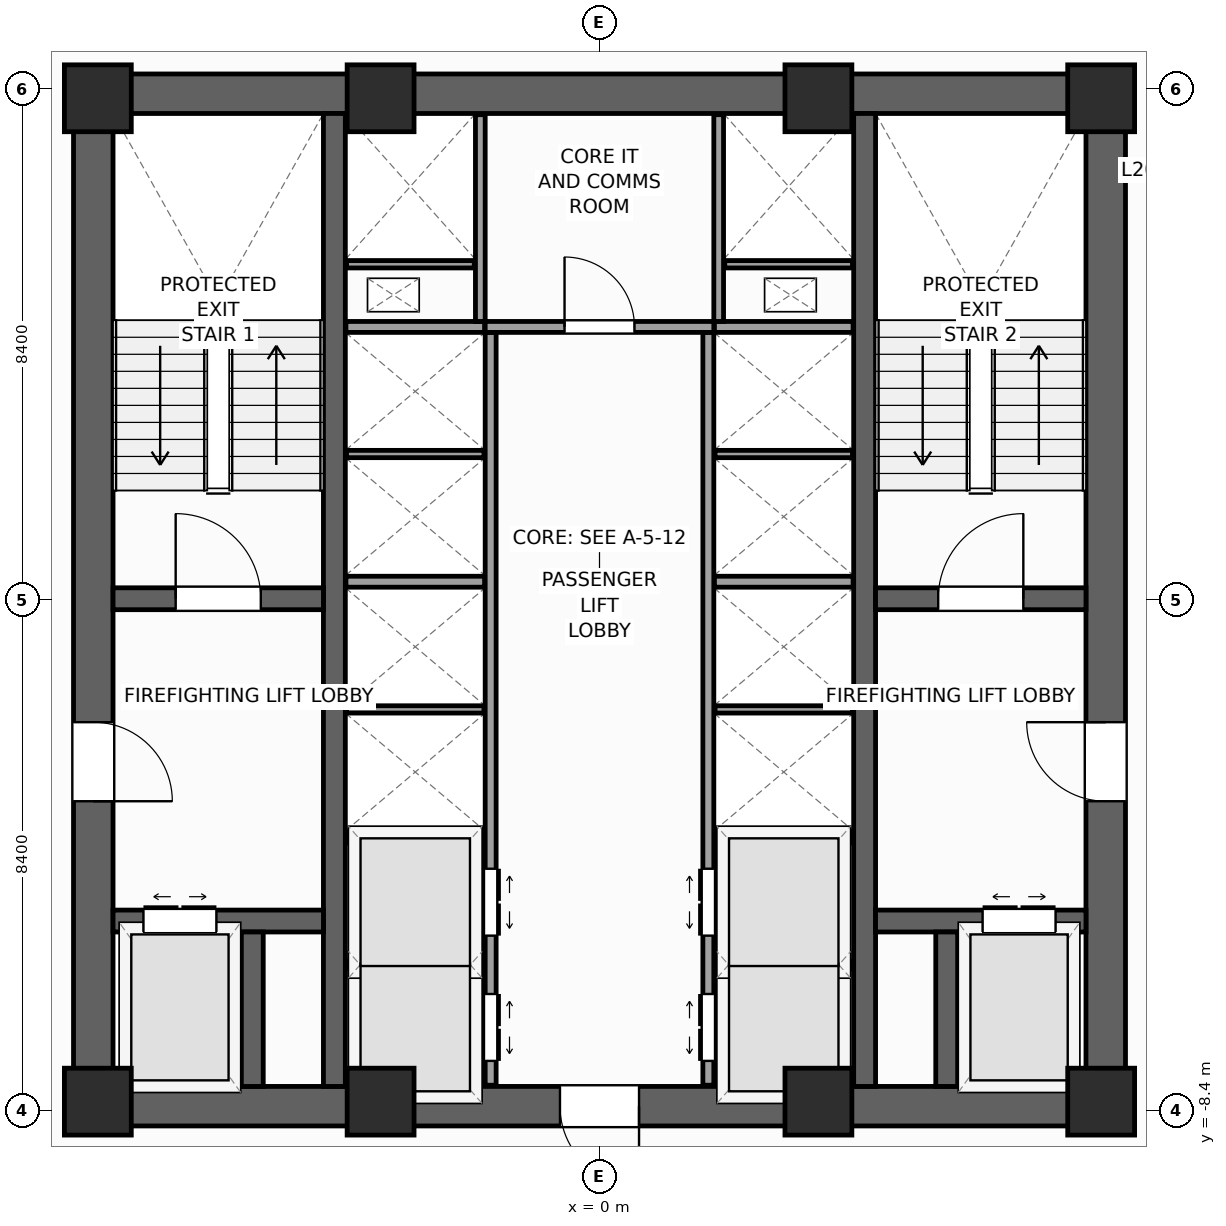
"""IFC4 building model, lengths in metres.
Left out: names, types, materials, properties, quantities, classifications, styles, units other than length and angle.
Written with IfcOpenShell. Run it as: python <this file> out.ifc"""

import sys

from ifc_helpers import new_model, si_unit, direction, frame, frame_2d, origin, origin_2d, place, context, subcontext, project, spatial, rectangle, extrude, source, transform, mapped, element, fill, save


model = new_model("IFC4")
c1 = context("Model", 3, precision=1e-05, world=origin(), true_north=direction((0.0, 1.0)))
c2 = subcontext(c1, "Body", "Model", "MODEL_VIEW")
j1 = project(units=[si_unit("LENGTHUNIT", "METRE"), si_unit("PLANEANGLEUNIT", "RADIAN")], contexts=[c1])
p1 = place(None, origin())
s1 = spatial("IfcSite", under=j1, at=p1, CompositionType="ELEMENT")
p2 = place(p1, origin())
s2 = spatial("IfcBuilding", under=s1, at=p2, CompositionType="ELEMENT")
p3 = place(p2, frame((0.0, 0.0, 87.2)))
s3 = spatial("IfcBuildingStorey", under=s2, at=p3, CompositionType="ELEMENT", Elevation=87.2)
p4 = place(p3, frame((-8.65, -8.325, 0.0), z_axis=(0.0, 0.0, 1.0), x_axis=(1.0, 0.0, 0.0)))
e1 = element("IfcWall", 1, at=p4, inside=s3, PredefinedType="SHEAR", context=c2, shape_type="SweptSolid", body=[
    extrude(rectangle(XDim=17.3, YDim=0.65, at=frame_2d((8.65, 0.0))), origin(), (0.0, 0.0, 1.0), 4.0),
])
p5 = place(p4, frame((8.0, 0.0, 0.0)))
e2 = element("IfcOpeningElement", 2, at=p5, cuts=e1, PredefinedType="OPENING", context=c2, shape_type="SweptSolid", body=[
    extrude(rectangle(XDim=1.3, YDim=2.2, at=frame_2d((0.65, 1.1))), frame((0.0, 0.335, 0.0), z_axis=(0.0, -1.0, 0.0), x_axis=(1.0, 0.0, 0.0)), (0.0, 0.0, 1.0), 0.67),
])
p6 = place(p3, frame((-8.65, 8.325, 0.0), z_axis=(0.0, 0.0, 1.0), x_axis=(1.0, 0.0, 0.0)))
e3 = element("IfcWall", 3, at=p6, inside=s3, PredefinedType="SHEAR", context=c2, shape_type="SweptSolid", body=[
    extrude(rectangle(XDim=17.3, YDim=0.65, at=frame_2d((8.65, 0.0))), origin(), (0.0, 0.0, 1.0), 4.0),
])
p7 = place(p3, frame((-8.325, -8.0, 0.0), z_axis=(0.0, 0.0, 1.0), x_axis=(0.0, 1.0, 0.0)))
e4 = element("IfcWall", 4, at=p7, inside=s3, PredefinedType="SHEAR", context=c2, shape_type="SweptSolid", body=[
    extrude(rectangle(XDim=16.0, YDim=0.65, at=frame_2d((8.0, 0.0))), origin(), (0.0, 0.0, 1.0), 4.0),
])
p8 = place(p7, frame((4.69, 0.0, 0.0)))
e5 = element("IfcOpeningElement", 5, at=p8, cuts=e4, PredefinedType="OPENING", context=c2, shape_type="SweptSolid", body=[
    extrude(rectangle(XDim=1.3, YDim=2.2, at=frame_2d((0.65, 1.1))), frame((0.0, 0.335, 0.0), z_axis=(0.0, -1.0, 0.0), x_axis=(1.0, 0.0, 0.0)), (0.0, 0.0, 1.0), 0.67),
])
p9 = place(p3, frame((8.325, -8.0, 0.0), z_axis=(0.0, 0.0, 1.0), x_axis=(0.0, 1.0, 0.0)))
e6 = element("IfcWall", 6, at=p9, inside=s3, PredefinedType="SHEAR", context=c2, shape_type="SweptSolid", body=[
    extrude(rectangle(XDim=16.0, YDim=0.65, at=frame_2d((8.0, 0.0))), origin(), (0.0, 0.0, 1.0), 4.0),
])
p10 = place(p9, frame((4.69, 0.0, 0.0)))
e7 = element("IfcOpeningElement", 7, at=p10, cuts=e6, PredefinedType="OPENING", context=c2, shape_type="SweptSolid", body=[
    extrude(rectangle(XDim=1.3, YDim=2.2, at=frame_2d((0.65, 1.1))), frame((0.0, 0.335, 0.0), z_axis=(0.0, -1.0, 0.0), x_axis=(1.0, 0.0, 0.0)), (0.0, 0.0, 1.0), 0.67),
])
for number, where, z_axis, x_axis in (
    (8, (-4.36, -8.0, 0.0), (0.0, 0.0, 1.0), (0.0, 1.0, 0.0)),
    (9, (4.36, -8.0, 0.0), (0.0, 0.0, 1.0), (0.0, 1.0, 0.0)),
):
    element("IfcWall", number, at=place(p3, frame(where, z_axis=z_axis, x_axis=x_axis)), inside=s3, PredefinedType="SHEAR", context=c2, shape_type="SweptSolid", body=[
        extrude(rectangle(XDim=16.0, YDim=0.36, at=frame_2d((8.0, 0.0))), origin(), (0.0, 0.0, 1.0), 4.0),
    ])
p11 = place(p3, frame((-8.0, 0.02, 0.0), z_axis=(0.0, 0.0, 1.0), x_axis=(1.0, 0.0, 0.0)))
e10 = element("IfcWall", 10, at=p11, inside=s3, PredefinedType="SHEAR", context=c2, shape_type="SweptSolid", body=[
    extrude(rectangle(XDim=3.46, YDim=0.36, at=frame_2d((1.73, 0.0))), origin(), (0.0, 0.0, 1.0), 4.0),
])
p12 = place(p11, frame((1.03, 0.0, 0.0)))
e11 = element("IfcOpeningElement", 11, at=p12, cuts=e10, PredefinedType="OPENING", context=c2, shape_type="SweptSolid", body=[
    extrude(rectangle(XDim=1.4, YDim=2.2, at=frame_2d((0.7, 1.1))), frame((0.0, 0.19, 0.0), z_axis=(0.0, -1.0, 0.0), x_axis=(1.0, 0.0, 0.0)), (0.0, 0.0, 1.0), 0.38),
])
p13 = place(p3, frame((4.54, 0.02, 0.0), z_axis=(0.0, 0.0, 1.0), x_axis=(1.0, 0.0, 0.0)))
e12 = element("IfcWall", 12, at=p13, inside=s3, PredefinedType="SHEAR", context=c2, shape_type="SweptSolid", body=[
    extrude(rectangle(XDim=3.46, YDim=0.36, at=frame_2d((1.73, 0.0))), origin(), (0.0, 0.0, 1.0), 4.0),
])
p14 = place(p13, frame((1.03, 0.0, 0.0)))
e13 = element("IfcOpeningElement", 13, at=p14, cuts=e12, PredefinedType="OPENING", context=c2, shape_type="SweptSolid", body=[
    extrude(rectangle(XDim=1.4, YDim=2.2, at=frame_2d((0.7, 1.1))), frame((0.0, 0.19, 0.0), z_axis=(0.0, -1.0, 0.0), x_axis=(1.0, 0.0, 0.0)), (0.0, 0.0, 1.0), 0.38),
])
p15 = place(p3, frame((-8.0, -5.28, 0.0), z_axis=(0.0, 0.0, 1.0), x_axis=(1.0, 0.0, 0.0)))
e14 = element("IfcWall", 14, at=p15, inside=s3, PredefinedType="SHEAR", context=c2, shape_type="SweptSolid", body=[
    extrude(rectangle(XDim=3.46, YDim=0.36, at=frame_2d((1.73, 0.0))), origin(), (0.0, 0.0, 1.0), 4.0),
])
p16 = place(p15, frame((0.5, 0.0, 0.0)))
e15 = element("IfcOpeningElement", 15, at=p16, cuts=e14, PredefinedType="OPENING", context=c2, shape_type="SweptSolid", body=[
    extrude(rectangle(XDim=1.2, YDim=2.25, at=frame_2d((0.6, 1.125))), frame((0.0, 0.19, 0.0), z_axis=(0.0, -1.0, 0.0), x_axis=(1.0, 0.0, 0.0)), (0.0, 0.0, 1.0), 0.38),
])
p17 = place(p3, frame((4.54, -5.28, 0.0), z_axis=(0.0, 0.0, 1.0), x_axis=(1.0, 0.0, 0.0)))
e16 = element("IfcWall", 16, at=p17, inside=s3, PredefinedType="SHEAR", context=c2, shape_type="SweptSolid", body=[
    extrude(rectangle(XDim=3.46, YDim=0.36, at=frame_2d((1.73, 0.0))), origin(), (0.0, 0.0, 1.0), 4.0),
])
p18 = place(p17, frame((1.76, 0.0, 0.0)))
e17 = element("IfcOpeningElement", 17, at=p18, cuts=e16, PredefinedType="OPENING", context=c2, shape_type="SweptSolid", body=[
    extrude(rectangle(XDim=1.2, YDim=2.25, at=frame_2d((0.6, 1.125))), frame((0.0, 0.19, 0.0), z_axis=(0.0, -1.0, 0.0), x_axis=(1.0, 0.0, 0.0)), (0.0, 0.0, 1.0), 0.38),
])
for number, where, z_axis, x_axis in (
    (18, (-5.71, -8.0, 0.0), (0.0, 0.0, 1.0), (0.0, 1.0, 0.0)),
    (19, (5.71, -8.0, 0.0), (0.0, 0.0, 1.0), (0.0, 1.0, 0.0)),
):
    element("IfcWall", number, at=place(p3, frame(where, z_axis=z_axis, x_axis=x_axis)), inside=s3, PredefinedType="SHEAR", context=c2, shape_type="SweptSolid", body=[
        extrude(rectangle(XDim=2.54, YDim=0.36, at=frame_2d((1.27, 0.0))), origin(), (0.0, 0.0, 1.0), 4.0),
    ])
m1 = source(origin(), c2, "Body", "SweptSolid", [
    extrude(rectangle(XDim=1.1, YDim=1.1, at=origin_2d()), origin(), (0.0, 0.0, 1.0), 4.0),
])
for number, where, z_axis, x_axis in (
    (20, (-8.25, -8.25, 0.0), (0.0, 0.0, 1.0), (1.0, 0.0, 0.0)),
    (21, (8.25, -8.25, 0.0), (0.0, 0.0, 1.0), (1.0, 0.0, 0.0)),
    (22, (8.25, 8.25, 0.0), (0.0, 0.0, 1.0), (1.0, 0.0, 0.0)),
    (23, (-8.25, 8.25, 0.0), (0.0, 0.0, 1.0), (1.0, 0.0, 0.0)),
    (24, (-3.6, -8.25, 0.0), (0.0, 0.0, 1.0), (1.0, 0.0, 0.0)),
    (25, (3.6, -8.25, 0.0), (0.0, 0.0, 1.0), (1.0, 0.0, 0.0)),
    (26, (-3.6, 8.25, 0.0), (0.0, 0.0, 1.0), (1.0, 0.0, 0.0)),
    (27, (3.6, 8.25, 0.0), (0.0, 0.0, 1.0), (1.0, 0.0, 0.0)),
):
    element("IfcColumn", number, at=place(p3, frame(where, z_axis=z_axis, x_axis=x_axis)), inside=s3, PredefinedType="PILASTER", context=c2, shape_type="MappedRepresentation", body=[
        mapped(m1, transform((0.0, 0.0, 0.0), scale=1.0)),
    ])
p19 = place(p3, frame((-1.79, -7.98, 0.0), z_axis=(0.0, 0.0, 1.0), x_axis=(0.0, 1.0, 0.0)))
e28 = element("IfcWall", 28, at=p19, inside=s3, PredefinedType="PARTITIONING", context=c2, shape_type="SweptSolid", body=[
    extrude(rectangle(XDim=12.38, YDim=0.18, at=frame_2d((6.19, 0.0))), origin(), (0.0, 0.0, 1.0), 3.74),
])
p20 = place(p19, frame((0.4, 0.0, 0.0)))
e29 = element("IfcOpeningElement", 29, at=p20, cuts=e28, PredefinedType="OPENING", context=c2, shape_type="SweptSolid", body=[
    extrude(rectangle(XDim=1.1, YDim=2.2, at=frame_2d((0.55, 1.1))), frame((0.0, 0.1, 0.0), z_axis=(0.0, -1.0, 0.0), x_axis=(1.0, 0.0, 0.0)), (0.0, 0.0, 1.0), 0.2),
])
p21 = place(p19, frame((2.46, 0.0, 0.0)))
e30 = element("IfcOpeningElement", 30, at=p21, cuts=e28, PredefinedType="OPENING", context=c2, shape_type="SweptSolid", body=[
    extrude(rectangle(XDim=1.1, YDim=2.2, at=frame_2d((0.55, 1.1))), frame((0.0, 0.1, 0.0), z_axis=(0.0, -1.0, 0.0), x_axis=(1.0, 0.0, 0.0)), (0.0, 0.0, 1.0), 0.2),
])
p22 = place(p3, frame((1.79, -7.98, 0.0), z_axis=(0.0, 0.0, 1.0), x_axis=(0.0, 1.0, 0.0)))
e31 = element("IfcWall", 31, at=p22, inside=s3, PredefinedType="PARTITIONING", context=c2, shape_type="SweptSolid", body=[
    extrude(rectangle(XDim=12.38, YDim=0.18, at=frame_2d((6.19, 0.0))), origin(), (0.0, 0.0, 1.0), 3.74),
])
p23 = place(p22, frame((0.4, 0.0, 0.0)))
e32 = element("IfcOpeningElement", 32, at=p23, cuts=e31, PredefinedType="OPENING", context=c2, shape_type="SweptSolid", body=[
    extrude(rectangle(XDim=1.1, YDim=2.2, at=frame_2d((0.55, 1.1))), frame((0.0, 0.1, 0.0), z_axis=(0.0, -1.0, 0.0), x_axis=(1.0, 0.0, 0.0)), (0.0, 0.0, 1.0), 0.2),
])
p24 = place(p22, frame((2.46, 0.0, 0.0)))
e33 = element("IfcOpeningElement", 33, at=p24, cuts=e31, PredefinedType="OPENING", context=c2, shape_type="SweptSolid", body=[
    extrude(rectangle(XDim=1.1, YDim=2.2, at=frame_2d((0.55, 1.1))), frame((0.0, 0.1, 0.0), z_axis=(0.0, -1.0, 0.0), x_axis=(1.0, 0.0, 0.0)), (0.0, 0.0, 1.0), 0.2),
])
p25 = place(p3, frame((-1.88, 4.49, 0.0), z_axis=(0.0, 0.0, 1.0), x_axis=(1.0, 0.0, 0.0)))
e34 = element("IfcWall", 34, at=p25, inside=s3, PredefinedType="PARTITIONING", context=c2, shape_type="SweptSolid", body=[
    extrude(rectangle(XDim=3.76, YDim=0.18, at=frame_2d((1.88, 0.0))), origin(), (0.0, 0.0, 1.0), 3.74),
])
p26 = place(p25, frame((1.305, 0.0, 0.0)))
e35 = element("IfcOpeningElement", 35, at=p26, cuts=e34, PredefinedType="OPENING", context=c2, shape_type="SweptSolid", body=[
    extrude(rectangle(XDim=1.15, YDim=2.25, at=frame_2d((0.575, 1.125))), frame((0.0, 0.1, 0.0), z_axis=(0.0, -1.0, 0.0), x_axis=(1.0, 0.0, 0.0)), (0.0, 0.0, 1.0), 0.2),
])
for number, where, z_axis, x_axis in (
    (36, (-4.17, -3.9, 0.0), (0.0, 0.0, 1.0), (1.0, 0.0, 0.0)),
    (37, (1.89, -3.9, 0.0), (0.0, 0.0, 1.0), (1.0, 0.0, 0.0)),
    (38, (-4.17, 0.3, 0.0), (0.0, 0.0, 1.0), (1.0, 0.0, 0.0)),
    (39, (1.89, 0.3, 0.0), (0.0, 0.0, 1.0), (1.0, 0.0, 0.0)),
    (40, (-4.17, 4.49, 0.0), (0.0, 0.0, 1.0), (1.0, 0.0, 0.0)),
    (41, (1.89, 4.49, 0.0), (0.0, 0.0, 1.0), (1.0, 0.0, 0.0)),
):
    element("IfcWall", number, at=place(p3, frame(where, z_axis=z_axis, x_axis=x_axis)), inside=s3, PredefinedType="PARTITIONING", context=c2, shape_type="SweptSolid", body=[
        extrude(rectangle(XDim=2.28, YDim=0.18, at=frame_2d((1.14, 0.0))), origin(), (0.0, 0.0, 1.0), 3.74),
    ])
for number, where, z_axis, x_axis in (
    (42, (-4.16, -6.0, 0.0), (0.0, 0.0, 1.0), (1.0, 0.0, 0.0)),
    (43, (1.9, -6.0, 0.0), (0.0, 0.0, 1.0), (1.0, 0.0, 0.0)),
    (44, (-4.16, -1.8, 0.0), (0.0, 0.0, 1.0), (1.0, 0.0, 0.0)),
    (45, (1.9, -1.8, 0.0), (0.0, 0.0, 1.0), (1.0, 0.0, 0.0)),
    (46, (-4.16, 2.4, 0.0), (0.0, 0.0, 1.0), (1.0, 0.0, 0.0)),
    (47, (1.9, 2.4, 0.0), (0.0, 0.0, 1.0), (1.0, 0.0, 0.0)),
):
    element("IfcWall", number, at=place(p3, frame(where, z_axis=z_axis, x_axis=x_axis)), inside=s3, PredefinedType="PARTITIONING", context=c2, shape_type="SweptSolid", body=[
        extrude(rectangle(XDim=2.26, YDim=0.12, at=frame_2d((1.13, 0.0))), origin(), (0.0, 0.0, 1.0), 3.74),
    ])
for number, where, z_axis, x_axis in (
    (48, (-1.96, 4.58, 0.0), (0.0, 0.0, 1.0), (0.0, 1.0, 0.0)),
    (49, (1.96, 4.58, 0.0), (0.0, 0.0, 1.0), (0.0, 1.0, 0.0)),
):
    element("IfcWall", number, at=place(p3, frame(where, z_axis=z_axis, x_axis=x_axis)), inside=s3, PredefinedType="PARTITIONING", context=c2, shape_type="SweptSolid", body=[
        extrude(rectangle(XDim=3.4, YDim=0.16, at=frame_2d((1.7, 0.0))), origin(), (0.0, 0.0, 1.0), 3.74),
    ])
for number, where, z_axis, x_axis in (
    (50, (-4.16, 5.52, 0.0), (0.0, 0.0, 1.0), (1.0, 0.0, 0.0)),
    (51, (2.06, 5.52, 0.0), (0.0, 0.0, 1.0), (1.0, 0.0, 0.0)),
):
    element("IfcWall", number, at=place(p3, frame(where, z_axis=z_axis, x_axis=x_axis)), inside=s3, PredefinedType="PARTITIONING", context=c2, shape_type="SweptSolid", body=[
        extrude(rectangle(XDim=2.1, YDim=0.12, at=frame_2d((1.05, 0.0))), origin(), (0.0, 0.0, 1.0), 3.74),
    ])
m2 = source(origin(), c2, "Body", "SweptSolid", [
    extrude(rectangle(XDim=1.4, YDim=2.2, at=frame_2d((0.7, 1.1))), frame((0.0, 0.025, 0.0), z_axis=(0.0, -1.0, 0.0), x_axis=(1.0, 0.0, 0.0)), (0.0, 0.0, 1.0), 0.05),
])
p27 = place(p12, origin())
e52 = element("IfcDoor", 52, at=p27, inside=s3, OperationType="SINGLE_SWING_LEFT", PredefinedType="DOOR", context=c2, shape_type="MappedRepresentation", body=[
    mapped(m2, transform((0.0, 0.0, 0.0), scale=1.0)),
])
fill(e11, e52)
p28 = place(p14, origin())
e53 = element("IfcDoor", 53, at=p28, inside=s3, OperationType="SINGLE_SWING_RIGHT", PredefinedType="DOOR", context=c2, shape_type="MappedRepresentation", body=[
    mapped(m2, transform((0.0, 0.0, 0.0), scale=1.0)),
])
fill(e13, e53)
m3 = source(origin(), c2, "Body", "SweptSolid", [
    extrude(rectangle(XDim=1.3, YDim=2.2, at=frame_2d((0.65, 1.1))), frame((0.0, 0.025, 0.0), z_axis=(0.0, -1.0, 0.0), x_axis=(1.0, 0.0, 0.0)), (0.0, 0.0, 1.0), 0.05),
])
p29 = place(p8, frame((1.3, 0.0, 0.0), z_axis=(0.0, 0.0, 1.0), x_axis=(-1.0, 0.0, 0.0)))
e54 = element("IfcDoor", 54, at=p29, inside=s3, OperationType="SINGLE_SWING_LEFT", PredefinedType="DOOR", context=c2, shape_type="MappedRepresentation", body=[
    mapped(m3, transform((0.0, 0.0, 0.0), scale=1.0)),
])
fill(e5, e54)
p30 = place(p10, origin())
e55 = element("IfcDoor", 55, at=p30, inside=s3, OperationType="SINGLE_SWING_RIGHT", PredefinedType="DOOR", context=c2, shape_type="MappedRepresentation", body=[
    mapped(m3, transform((0.0, 0.0, 0.0), scale=1.0)),
])
fill(e7, e55)
p31 = place(p5, frame((1.3, 0.0, 0.0), z_axis=(0.0, 0.0, 1.0), x_axis=(-1.0, 0.0, 0.0)))
e56 = element("IfcDoor", 56, at=p31, inside=s3, OperationType="SINGLE_SWING_RIGHT", PredefinedType="DOOR", context=c2, shape_type="MappedRepresentation", body=[
    mapped(m3, transform((0.0, 0.0, 0.0), scale=1.0)),
])
fill(e2, e56)
m4 = source(origin(), c2, "Body", "SweptSolid", [
    extrude(rectangle(XDim=1.2, YDim=2.25, at=frame_2d((0.6, 1.125))), frame((0.0, 0.025, 0.0), z_axis=(0.0, -1.0, 0.0), x_axis=(1.0, 0.0, 0.0)), (0.0, 0.0, 1.0), 0.05),
])
p32 = place(p16, origin())
e57 = element("IfcDoor", 57, at=p32, inside=s3, OperationType="DOUBLE_DOOR_SLIDING", PredefinedType="DOOR", context=c2, shape_type="MappedRepresentation", body=[
    mapped(m4, transform((0.0, 0.0, 0.0), scale=1.0)),
])
fill(e15, e57)
p33 = place(p18, origin())
e58 = element("IfcDoor", 58, at=p33, inside=s3, OperationType="DOUBLE_DOOR_SLIDING", PredefinedType="DOOR", context=c2, shape_type="MappedRepresentation", body=[
    mapped(m4, transform((0.0, 0.0, 0.0), scale=1.0)),
])
fill(e17, e58)
m5 = source(origin(), c2, "Body", "SweptSolid", [
    extrude(rectangle(XDim=1.1, YDim=2.2, at=frame_2d((0.55, 1.1))), frame((0.0, 0.025, 0.0), z_axis=(0.0, -1.0, 0.0), x_axis=(1.0, 0.0, 0.0)), (0.0, 0.0, 1.0), 0.05),
])
p34 = place(p20, frame((1.1, 0.0, 0.0), z_axis=(0.0, 0.0, 1.0), x_axis=(-1.0, 0.0, 0.0)))
e59 = element("IfcDoor", 59, at=p34, inside=s3, OperationType="DOUBLE_DOOR_SLIDING", PredefinedType="DOOR", context=c2, shape_type="MappedRepresentation", body=[
    mapped(m5, transform((0.0, 0.0, 0.0), scale=1.0)),
])
fill(e29, e59)
p35 = place(p21, frame((1.1, 0.0, 0.0), z_axis=(0.0, 0.0, 1.0), x_axis=(-1.0, 0.0, 0.0)))
e60 = element("IfcDoor", 60, at=p35, inside=s3, OperationType="DOUBLE_DOOR_SLIDING", PredefinedType="DOOR", context=c2, shape_type="MappedRepresentation", body=[
    mapped(m5, transform((0.0, 0.0, 0.0), scale=1.0)),
])
fill(e30, e60)
p36 = place(p23, origin())
e61 = element("IfcDoor", 61, at=p36, inside=s3, OperationType="DOUBLE_DOOR_SLIDING", PredefinedType="DOOR", context=c2, shape_type="MappedRepresentation", body=[
    mapped(m5, transform((0.0, 0.0, 0.0), scale=1.0)),
])
fill(e32, e61)
p37 = place(p24, origin())
e62 = element("IfcDoor", 62, at=p37, inside=s3, OperationType="DOUBLE_DOOR_SLIDING", PredefinedType="DOOR", context=c2, shape_type="MappedRepresentation", body=[
    mapped(m5, transform((0.0, 0.0, 0.0), scale=1.0)),
])
fill(e33, e62)
m6 = source(origin(), c2, "Body", "SweptSolid", [
    extrude(rectangle(XDim=1.15, YDim=2.25, at=frame_2d((0.575, 1.125))), frame((0.0, 0.025, 0.0), z_axis=(0.0, -1.0, 0.0), x_axis=(1.0, 0.0, 0.0)), (0.0, 0.0, 1.0), 0.05),
])
p38 = place(p26, origin())
e63 = element("IfcDoor", 63, at=p38, inside=s3, OperationType="SINGLE_SWING_LEFT", PredefinedType="DOOR", context=c2, shape_type="MappedRepresentation", body=[
    mapped(m6, transform((0.0, 0.0, 0.0), scale=1.0)),
])
fill(e35, e63)
save(model, sys.argv[1])
